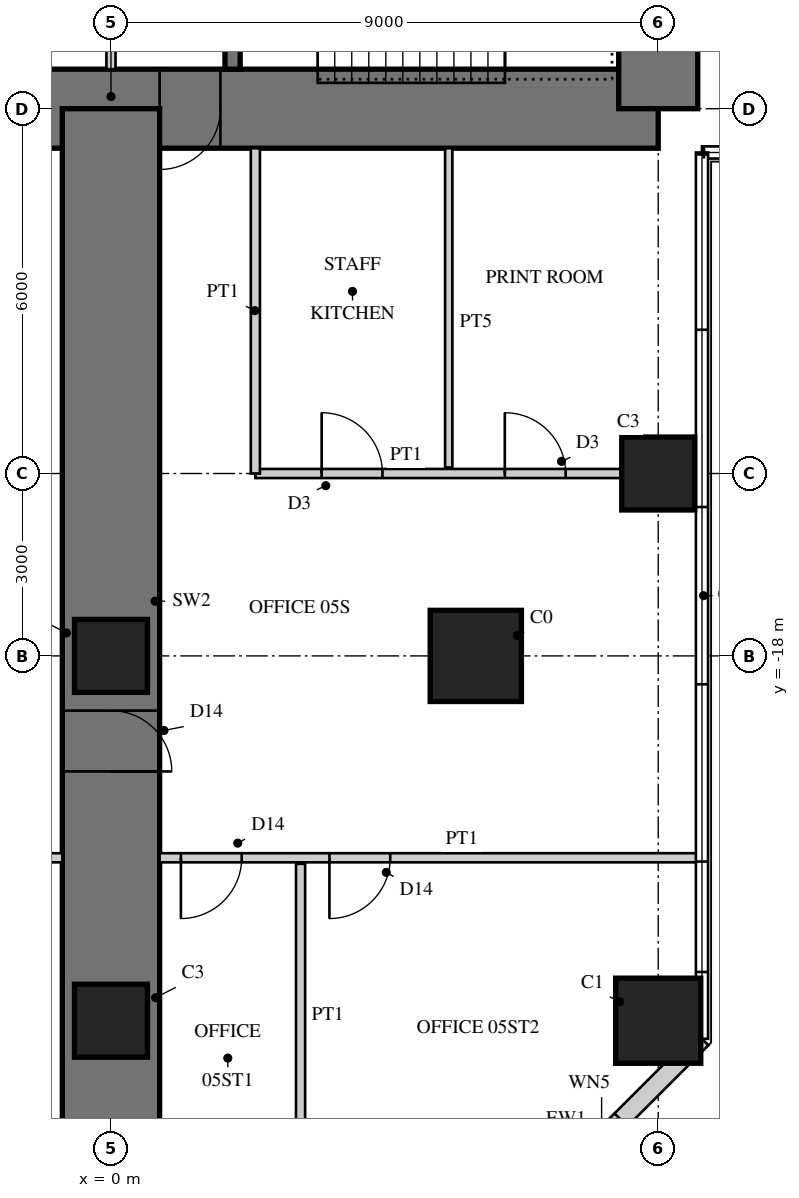
"""IFC4 building model, lengths in metres.
Left out: names, types, materials, properties, quantities, classifications, styles, units other than length and angle.
Written with IfcOpenShell. Run it as: python <this file> out.ifc"""

import sys

from ifc_helpers import new_model, si_unit, direction, frame, frame_2d, origin, origin_2d, place, context, subcontext, project, spatial, rectangle, extrude, element, fill, save


model = new_model("IFC4")
c1 = context("Model", 3, precision=1e-05, world=origin(), true_north=direction((0.0, 1.0)))
c2 = subcontext(c1, "Body", "Model", "MODEL_VIEW")
j1 = project(units=[si_unit("LENGTHUNIT", "METRE"), si_unit("PLANEANGLEUNIT", "RADIAN")], contexts=[c1])
p1 = place(None, origin())
s1 = spatial("IfcSite", under=j1, at=p1, CompositionType="ELEMENT")
p2 = place(p1, origin())
s2 = spatial("IfcBuilding", under=s1, at=p2, CompositionType="ELEMENT")
p3 = place(p2, frame((0.0, 0.0, 23.5)))
s3 = spatial("IfcBuildingStorey", under=s2, at=p3, CompositionType="ELEMENT", Elevation=23.5)
p4 = place(p3, frame((-9.0, -9.0, 0.0), z_axis=(0.0, 0.0, 1.0), x_axis=(1.0, 0.0, 0.0)))
e1 = element("IfcWall", 1, at=p4, inside=s3, PredefinedType="SHEAR", context=c2, shape_type="SweptSolid", body=[
    extrude(rectangle(XDim=18.0, YDim=1.3, at=frame_2d((9.0, 0.0))), origin(), (0.0, 0.0, 1.0), 4.0),
])
p5 = place(p4, frame((9.8, 0.0, 0.0)))
e2 = element("IfcOpeningElement", 2, at=p5, cuts=e1, PredefinedType="OPENING", context=c2, shape_type="SweptSolid", body=[
    extrude(rectangle(XDim=1.0, YDim=2.4, at=frame_2d((0.5, 1.2))), frame((0.0, 0.66, 0.0), z_axis=(0.0, -1.0, 0.0), x_axis=(1.0, 0.0, 0.0)), (0.0, 0.0, 1.0), 1.32),
])
p6 = place(p3, frame((9.0, -9.0, 0.0), z_axis=(0.0, 0.0, 1.0), x_axis=(0.0, 1.0, 0.0)))
e3 = element("IfcWall", 3, at=p6, inside=s3, PredefinedType="SHEAR", context=c2, shape_type="SweptSolid", body=[
    extrude(rectangle(XDim=18.0, YDim=1.3, at=frame_2d((9.0, 0.0))), origin(), (0.0, 0.0, 1.0), 4.0),
])
p7 = place(p6, frame((9.8, 0.0, 0.0)))
e4 = element("IfcOpeningElement", 4, at=p7, cuts=e3, PredefinedType="OPENING", context=c2, shape_type="SweptSolid", body=[
    extrude(rectangle(XDim=1.0, YDim=2.4, at=frame_2d((0.5, 1.2))), frame((0.0, 0.66, 0.0), z_axis=(0.0, -1.0, 0.0), x_axis=(1.0, 0.0, 0.0)), (0.0, 0.0, 1.0), 1.32),
])
p8 = place(p3, frame((2.0, -1.675, 0.0), z_axis=(0.0, 0.0, 1.0), x_axis=(0.0, -1.0, 0.0)))
e5 = element("IfcWall", 5, at=p8, inside=s3, PredefinedType="SHEAR", context=c2, shape_type="SweptSolid", body=[
    extrude(rectangle(XDim=6.675, YDim=0.25, at=frame_2d((3.337, 0.0))), origin(), (0.0, 0.0, 1.0), 4.0),
])
p9 = place(p8, frame((0.725, 0.0, 0.0)))
e6 = element("IfcOpeningElement", 6, at=p9, cuts=e5, PredefinedType="OPENING", context=c2, shape_type="SweptSolid", body=[
    extrude(rectangle(XDim=1.0, YDim=2.1, at=frame_2d((0.5, 1.05))), frame((0.0, 0.135, 0.0), z_axis=(0.0, -1.0, 0.0), x_axis=(1.0, 0.0, 0.0)), (0.0, 0.0, 1.0), 0.27),
])
p10 = place(p3, frame((0.0, -9.0, 0.0), z_axis=(0.0, 0.0, 1.0), x_axis=(0.0, -1.0, 0.0)))
e7 = element("IfcWall", 7, at=p10, inside=s3, PredefinedType="SHEAR", context=c2, shape_type="SweptSolid", body=[
    extrude(rectangle(XDim=18.0, YDim=1.6, at=frame_2d((9.0, 0.0))), origin(), (0.0, 0.0, 1.0), 4.0),
])
p11 = place(p10, frame((9.9, 0.0, 0.0)))
e8 = element("IfcOpeningElement", 8, at=p11, cuts=e7, PredefinedType="OPENING", context=c2, shape_type="SweptSolid", body=[
    extrude(rectangle(XDim=1.0, YDim=2.2, at=frame_2d((0.5, 1.1))), frame((0.0, 0.81, 0.0), z_axis=(0.0, -1.0, 0.0), x_axis=(1.0, 0.0, 0.0)), (0.0, 0.0, 1.0), 1.62),
])
p12 = place(p3, frame((9.0, -15.0, 0.0), z_axis=(0.0, 0.0, 1.0), x_axis=(1.0, 0.0, 0.0)))
e9 = element("IfcColumn", 9, at=p12, inside=s3, PredefinedType="COLUMN", context=c2, shape_type="SweptSolid", body=[
    extrude(rectangle(XDim=1.2, YDim=1.2, at=origin_2d()), origin(), (0.0, 0.0, 1.0), 4.0),
])
p13 = place(p3, frame((9.0, -24.0, 0.0), z_axis=(0.0, 0.0, 1.0), x_axis=(1.0, 0.0, 0.0)))
e10 = element("IfcColumn", 10, at=p13, inside=s3, PredefinedType="COLUMN", context=c2, shape_type="SweptSolid", body=[
    extrude(rectangle(XDim=1.4, YDim=1.4, at=origin_2d()), origin(), (0.0, 0.0, 1.0), 4.0),
])
p14 = place(p3, frame((0.0, -18.0, 0.0), z_axis=(0.0, 0.0, 1.0), x_axis=(1.0, 0.0, 0.0)))
e11 = element("IfcColumn", 11, at=p14, inside=s3, PredefinedType="COLUMN", context=c2, shape_type="SweptSolid", body=[
    extrude(rectangle(XDim=1.2, YDim=1.2, at=origin_2d()), origin(), (0.0, 0.0, 1.0), 4.0),
])
p15 = place(p3, frame((6.0, -18.0, -0.2), z_axis=(0.0, 0.0, 1.0), x_axis=(1.0, 0.0, 0.0)))
e12 = element("IfcColumn", 12, at=p15, inside=s3, PredefinedType="COLUMN", context=c2, shape_type="SweptSolid", body=[
    extrude(rectangle(XDim=1.5, YDim=1.5, at=origin_2d()), origin(), (0.0, 0.0, 1.0), 4.2),
])
p16 = place(p3, frame((0.0, -24.0, 0.0), z_axis=(0.0, 0.0, 1.0), x_axis=(1.0, 0.0, 0.0)))
e13 = element("IfcColumn", 13, at=p16, inside=s3, PredefinedType="COLUMN", context=c2, shape_type="SweptSolid", body=[
    extrude(rectangle(XDim=1.2, YDim=1.2, at=origin_2d()), origin(), (0.0, 0.0, 1.0), 4.0),
])
p17 = place(p3, frame((6.418, -27.6, 0.0), z_axis=(0.0, 0.0, 1.0), x_axis=(0.707106781187, 0.707106781187, 0.0)))
e14 = element("IfcWall", 14, at=p17, inside=s3, PredefinedType="SOLIDWALL", context=c2, shape_type="SweptSolid", body=[
    extrude(rectangle(XDim=4.669, YDim=0.3, at=frame_2d((2.335, 0.0))), origin(), (0.0, 0.0, 1.0), 3.8),
])
p18 = place(p17, frame((1.885, 0.0, 0.3)))
e15 = element("IfcOpeningElement", 15, at=p18, cuts=e14, PredefinedType="OPENING", context=c2, shape_type="SweptSolid", body=[
    extrude(rectangle(XDim=0.9, YDim=2.4, at=frame_2d((0.45, 1.2))), frame((0.0, 0.16, 0.0), z_axis=(0.0, -1.0, 0.0), x_axis=(1.0, 0.0, 0.0)), (0.0, 0.0, 1.0), 0.32),
])
p19 = place(p3, frame((0.0, -5.675, 0.0), z_axis=(0.0, 0.0, 1.0), x_axis=(0.0, -1.0, 0.0)))
e16 = element("IfcWall", 16, at=p19, inside=s3, PredefinedType="PARTITIONING", context=c2, shape_type="SweptSolid", body=[
    extrude(rectangle(XDim=2.675, YDim=0.15, at=frame_2d((1.337, 0.0))), origin(), (0.0, 0.0, 1.0), 3.8),
])
p20 = place(p19, frame((0.4, 0.0, 0.0)))
e17 = element("IfcOpeningElement", 17, at=p20, cuts=e16, PredefinedType="OPENING", context=c2, shape_type="SweptSolid", body=[
    extrude(rectangle(XDim=1.0, YDim=2.1, at=frame_2d((0.5, 1.05))), frame((0.0, 0.085, 0.0), z_axis=(0.0, -1.0, 0.0), x_axis=(1.0, 0.0, 0.0)), (0.0, 0.0, 1.0), 0.17),
])
p21 = place(p3, frame((2.375, -15.0, 0.0), z_axis=(0.0, 0.0, 1.0), x_axis=(1.0, 0.0, 0.0)))
e18 = element("IfcWall", 18, at=p21, inside=s3, PredefinedType="PARTITIONING", context=c2, shape_type="SweptSolid", body=[
    extrude(rectangle(XDim=6.025, YDim=0.15, at=frame_2d((3.012, 0.0))), origin(), (0.0, 0.0, 1.0), 2.95),
])
p22 = place(p21, frame((1.09, 0.0, 0.0)))
e19 = element("IfcOpeningElement", 19, at=p22, cuts=e18, PredefinedType="OPENING", context=c2, shape_type="SweptSolid", body=[
    extrude(rectangle(XDim=1.0, YDim=2.1, at=frame_2d((0.5, 1.05))), frame((0.0, 0.085, 0.0), z_axis=(0.0, -1.0, 0.0), x_axis=(1.0, 0.0, 0.0)), (0.0, 0.0, 1.0), 0.17),
])
p23 = place(p21, frame((4.102, 0.0, 0.0)))
e20 = element("IfcOpeningElement", 20, at=p23, cuts=e18, PredefinedType="OPENING", context=c2, shape_type="SweptSolid", body=[
    extrude(rectangle(XDim=1.0, YDim=2.1, at=frame_2d((0.5, 1.05))), frame((0.0, 0.085, 0.0), z_axis=(0.0, -1.0, 0.0), x_axis=(1.0, 0.0, 0.0)), (0.0, 0.0, 1.0), 0.17),
])
p24 = place(p3, frame((2.375, -9.65, 0.0), z_axis=(0.0, 0.0, 1.0), x_axis=(0.0, -1.0, 0.0)))
e21 = element("IfcWall", 21, at=p24, inside=s3, PredefinedType="PARTITIONING", context=c2, shape_type="SweptSolid", body=[
    extrude(rectangle(XDim=5.35, YDim=0.15, at=frame_2d((2.675, 0.0))), origin(), (0.0, 0.0, 1.0), 3.8),
])
p25 = place(p3, frame((5.555, -9.65, 0.0), z_axis=(0.0, 0.0, 1.0), x_axis=(0.0, -1.0, 0.0)))
e22 = element("IfcWall", 22, at=p25, inside=s3, PredefinedType="PLUMBINGWALL", context=c2, shape_type="SweptSolid", body=[
    extrude(rectangle(XDim=5.25, YDim=0.12, at=frame_2d((2.625, 0.0))), origin(), (0.0, 0.0, 1.0), 3.8),
])
p26 = place(p3, frame((3.118, -21.42, 0.0), z_axis=(0.0, 0.0, 1.0), x_axis=(0.0, -1.0, 0.0)))
e23 = element("IfcWall", 23, at=p26, inside=s3, PredefinedType="PARTITIONING", context=c2, shape_type="SweptSolid", body=[
    extrude(rectangle(XDim=4.98, YDim=0.15, at=frame_2d((2.49, 0.0))), origin(), (0.0, 0.0, 1.0), 3.8),
])
p27 = place(p3, frame((0.8, -21.32, 0.0), z_axis=(0.0, 0.0, 1.0), x_axis=(1.0, 0.0, 0.0)))
e24 = element("IfcWall", 24, at=p27, inside=s3, PredefinedType="PARTITIONING", context=c2, shape_type="SweptSolid", body=[
    extrude(rectangle(XDim=8.88, YDim=0.15, at=frame_2d((4.44, 0.0))), origin(), (0.0, 0.0, 1.0), 3.8),
])
p28 = place(p27, frame((0.35, 0.0, 0.0)))
e25 = element("IfcOpeningElement", 25, at=p28, cuts=e24, PredefinedType="OPENING", context=c2, shape_type="SweptSolid", body=[
    extrude(rectangle(XDim=1.0, YDim=2.2, at=frame_2d((0.5, 1.1))), frame((0.0, 0.085, 0.0), z_axis=(0.0, -1.0, 0.0), x_axis=(1.0, 0.0, 0.0)), (0.0, 0.0, 1.0), 0.17),
])
p29 = place(p27, frame((2.793, 0.0, 0.0)))
e26 = element("IfcOpeningElement", 26, at=p29, cuts=e24, PredefinedType="OPENING", context=c2, shape_type="SweptSolid", body=[
    extrude(rectangle(XDim=1.0, YDim=2.2, at=frame_2d((0.5, 1.1))), frame((0.0, 0.085, 0.0), z_axis=(0.0, -1.0, 0.0), x_axis=(1.0, 0.0, 0.0)), (0.0, 0.0, 1.0), 0.17),
])
p30 = place(p3, frame((-9.68, -21.32, 0.0), z_axis=(0.0, 0.0, 1.0), x_axis=(1.0, 0.0, 0.0)))
e27 = element("IfcWall", 27, at=p30, inside=s3, PredefinedType="PARTITIONING", context=c2, shape_type="SweptSolid", body=[
    extrude(rectangle(XDim=8.88, YDim=0.15, at=frame_2d((4.44, 0.0))), origin(), (0.0, 0.0, 1.0), 3.8),
])
p31 = place(p30, frame((5.087, 0.0, 0.0)))
e28 = element("IfcOpeningElement", 28, at=p31, cuts=e27, PredefinedType="OPENING", context=c2, shape_type="SweptSolid", body=[
    extrude(rectangle(XDim=1.0, YDim=2.2, at=frame_2d((0.5, 1.1))), frame((0.0, 0.085, 0.0), z_axis=(0.0, -1.0, 0.0), x_axis=(1.0, 0.0, 0.0)), (0.0, 0.0, 1.0), 0.17),
])
p32 = place(p30, frame((7.53, 0.0, 0.0)))
e29 = element("IfcOpeningElement", 29, at=p32, cuts=e27, PredefinedType="OPENING", context=c2, shape_type="SweptSolid", body=[
    extrude(rectangle(XDim=1.0, YDim=2.2, at=frame_2d((0.5, 1.1))), frame((0.0, 0.085, 0.0), z_axis=(0.0, -1.0, 0.0), x_axis=(1.0, 0.0, 0.0)), (0.0, 0.0, 1.0), 0.17),
])
p33 = place(p22, origin())
e30 = element("IfcDoor", 30, at=p33, inside=s3, OperationType="SINGLE_SWING_LEFT", PredefinedType="DOOR", context=c2, shape_type="SweptSolid", body=[
    extrude(rectangle(XDim=1.0, YDim=2.1, at=frame_2d((0.5, 1.05))), frame((0.0, 0.025, 0.0), z_axis=(0.0, -1.0, 0.0), x_axis=(1.0, 0.0, 0.0)), (0.0, 0.0, 1.0), 0.05),
])
fill(e19, e30)
p34 = place(p23, origin())
e31 = element("IfcDoor", 31, at=p34, inside=s3, OperationType="SINGLE_SWING_LEFT", PredefinedType="DOOR", context=c2, shape_type="SweptSolid", body=[
    extrude(rectangle(XDim=1.0, YDim=2.1, at=frame_2d((0.5, 1.05))), frame((0.0, 0.025, 0.0), z_axis=(0.0, -1.0, 0.0), x_axis=(1.0, 0.0, 0.0)), (0.0, 0.0, 1.0), 0.05),
])
fill(e20, e31)
p35 = place(p28, frame((1.0, 0.0, 0.0), z_axis=(0.0, 0.0, 1.0), x_axis=(-1.0, 0.0, 0.0)))
e32 = element("IfcDoor", 32, at=p35, inside=s3, OperationType="SINGLE_SWING_RIGHT", PredefinedType="DOOR", context=c2, shape_type="SweptSolid", body=[
    extrude(rectangle(XDim=1.0, YDim=2.2, at=frame_2d((0.5, 1.1))), frame((0.0, 0.025, 0.0), z_axis=(0.0, -1.0, 0.0), x_axis=(1.0, 0.0, 0.0)), (0.0, 0.0, 1.0), 0.05),
])
fill(e25, e32)
p36 = place(p29, frame((1.0, 0.0, 0.0), z_axis=(0.0, 0.0, 1.0), x_axis=(-1.0, 0.0, 0.0)))
e33 = element("IfcDoor", 33, at=p36, inside=s3, OperationType="SINGLE_SWING_RIGHT", PredefinedType="DOOR", context=c2, shape_type="SweptSolid", body=[
    extrude(rectangle(XDim=1.0, YDim=2.2, at=frame_2d((0.5, 1.1))), frame((0.0, 0.025, 0.0), z_axis=(0.0, -1.0, 0.0), x_axis=(1.0, 0.0, 0.0)), (0.0, 0.0, 1.0), 0.05),
])
fill(e26, e33)
p37 = place(p11, origin())
e34 = element("IfcDoor", 34, at=p37, inside=s3, OperationType="SINGLE_SWING_RIGHT", PredefinedType="DOOR", context=c2, shape_type="SweptSolid", body=[
    extrude(rectangle(XDim=1.0, YDim=2.2, at=frame_2d((0.5, 1.1))), frame((0.0, 0.025, 0.0), z_axis=(0.0, -1.0, 0.0), x_axis=(1.0, 0.0, 0.0)), (0.0, 0.0, 1.0), 0.05),
])
fill(e8, e34)
p38 = place(p5, frame((1.0, 0.0, 0.0), z_axis=(0.0, 0.0, 1.0), x_axis=(-1.0, 0.0, 0.0)))
e35 = element("IfcDoor", 35, at=p38, inside=s3, OperationType="SINGLE_SWING_RIGHT", PredefinedType="DOOR", context=c2, shape_type="SweptSolid", body=[
    extrude(rectangle(XDim=1.0, YDim=2.4, at=frame_2d((0.5, 1.2))), frame((0.0, -0.005, 0.0), z_axis=(0.0, -1.0, 0.0), x_axis=(1.0, 0.0, 0.0)), (0.0, 0.0, 1.0), 0.05),
])
fill(e2, e35)
save(model, sys.argv[1])
